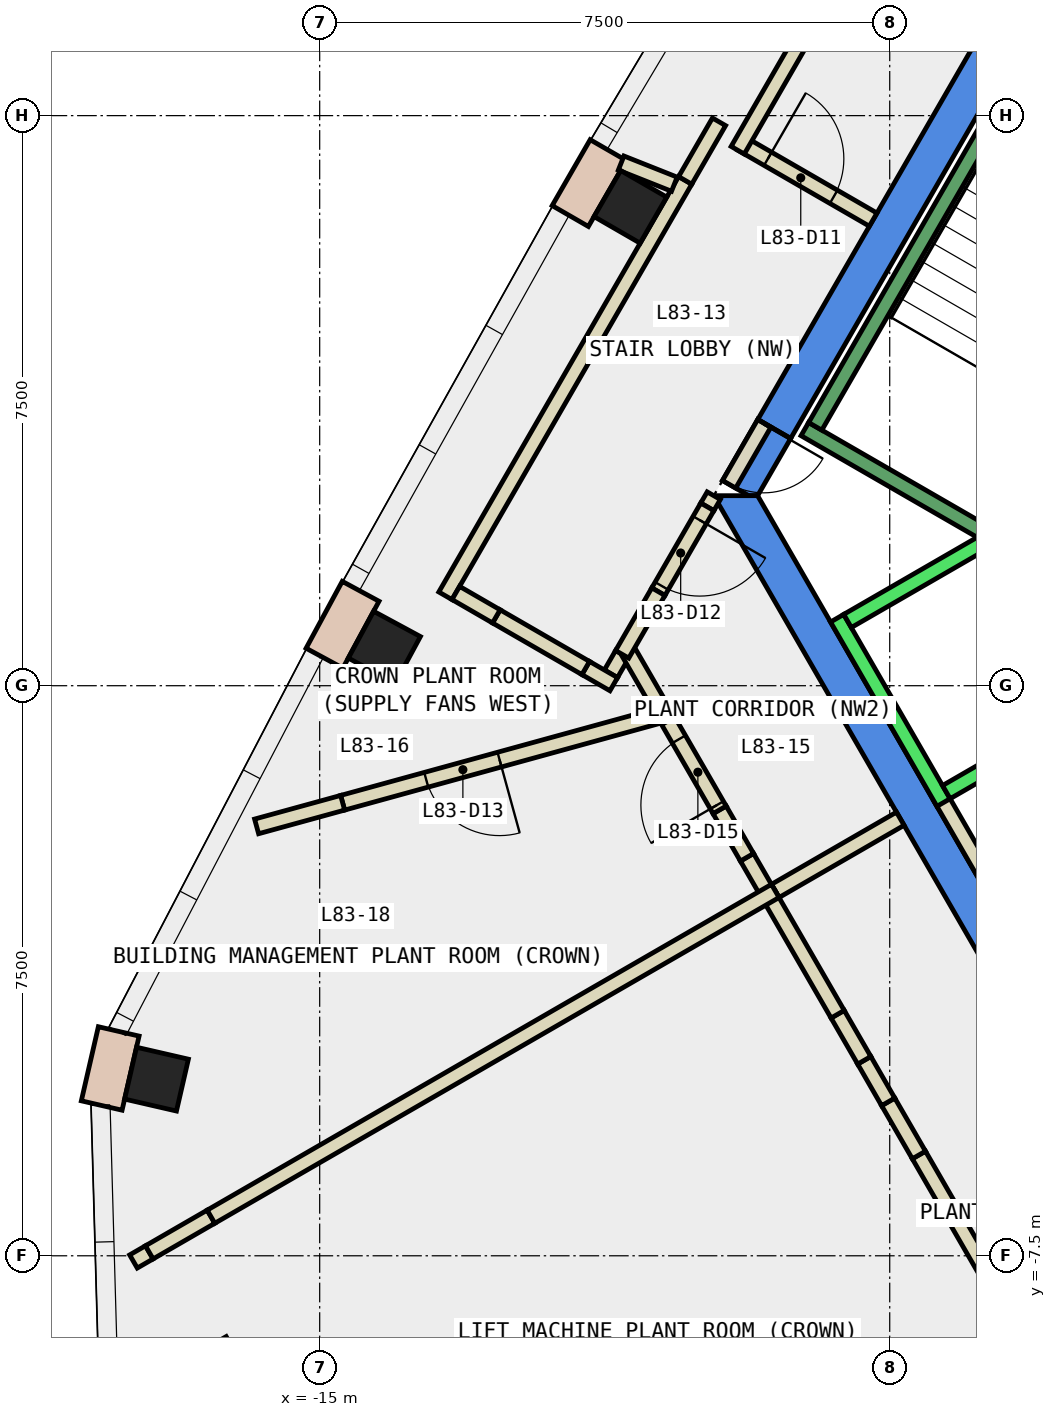
"""IFC4 building model, lengths in metres.
Left out: names, types, materials, properties, quantities, classifications, styles, units other than length and angle.
Written with IfcOpenShell. Run it as: python <this file> out.ifc"""

import sys

from ifc_helpers import new_model, si_unit, direction, frame, frame_2d, origin, origin_2d, place, context, subcontext, project, spatial, polyline, rectangle, outline, extrude, element, fill, save


model = new_model("IFC4")
c1 = context("Model", 3, precision=1e-05, world=origin(), true_north=direction((0.0, 1.0)))
c2 = subcontext(c1, "Body", "Model", "MODEL_VIEW")
j1 = project(units=[si_unit("LENGTHUNIT", "METRE"), si_unit("PLANEANGLEUNIT", "RADIAN")], contexts=[c1])
p1 = place(None, origin())
s1 = spatial("IfcSite", under=j1, at=p1, CompositionType="ELEMENT")
p2 = place(p1, origin())
s2 = spatial("IfcBuilding", under=s1, at=p2, CompositionType="ELEMENT")
p3 = place(p2, frame((0.0, 0.0, 353.9)))
s3 = spatial("IfcBuildingStorey", under=s2, at=p3, CompositionType="ELEMENT", Elevation=353.9)
for number, where, z_axis, x_axis in (
    (1, (-10.912, 6.3, -0.35), (0.0, 0.0, 1.0), (0.5, 0.866, 0.0)),
    (2, (-14.149, 0.505, -0.35), (0.0, 0.0, 1.0), (0.475, 0.88, 0.0)),
    (3, (-17.147, -5.176, -0.35), (0.0, 0.0, 1.0), (0.224, 0.974, 0.0)),
):
    element("IfcColumn", number, at=place(p3, frame(where, z_axis=z_axis, x_axis=x_axis)), inside=s3, PredefinedType="COLUMN", context=c2, shape_type="SweptSolid", body=[
        extrude(rectangle(XDim=0.7, YDim=0.7, at=origin_2d()), origin(), (0.0, 0.0, 1.0), 4.4),
    ])
p4 = place(p3, frame((-16.486, -9.519, -0.35), z_axis=(0.0, 0.0, 1.0), x_axis=(0.866025403784, 0.5, 0.0)))
e4 = element("IfcColumn", 4, at=p4, inside=s3, PredefinedType="COLUMN", context=c2, shape_type="SweptSolid", body=[
    extrude(rectangle(XDim=1.4, YDim=1.4, at=origin_2d()), origin(), (0.0, 0.0, 1.0), 4.4),
])
p5 = place(p3, frame((0.0, 0.0, -0.35)))
e5 = element("IfcWall", 5, at=p5, inside=s3, PredefinedType="SHEAR", context=c2, shape_type="SweptSolid", body=[
    extrude(outline(polyline([(-9.236, 3.502), (-8.803, 3.253), (-4.619, 10.5), (-4.907, 11.0), (-9.236, 3.502)])), origin(), (0.0, 0.0, 1.0), 4.4),
])
p6 = place(p3, frame((0.0, 0.0, 3.6)))
e6 = element("IfcWall", 6, at=p6, inside=s3, PredefinedType="SHEAR", context=c2, shape_type="SweptSolid", body=[
    extrude(outline(polyline([(-9.7, 2.7), (-9.354, 2.5), (-9.238, 2.5), (-8.803, 3.253), (-9.236, 3.502), (-9.7, 2.7)])), origin(), (0.0, 0.0, 1.0), 0.45),
])
p7 = place(p3, frame((0.0, 0.0, -0.35)))
e7 = element("IfcWall", 7, at=p7, inside=s3, PredefinedType="SHEAR", context=c2, shape_type="SweptSolid", body=[
    extrude(outline(polyline([(-9.815, 2.5), (-4.907, -6.0), (-4.619, -5.5), (-9.238, 2.5), (-9.815, 2.5)])), origin(), (0.0, 0.0, 1.0), 4.4),
])
p8 = place(p3, frame((-11.203, 7.046, 0.0), z_axis=(0.0, 0.0, 1.0), x_axis=(-0.49960277677, -0.866254619292, 0.0)))
e8 = element("IfcWall", 8, at=p8, inside=s3, PredefinedType="STANDARD", context=c2, shape_type="SweptSolid", body=[
    extrude(rectangle(XDim=1.001, YDim=0.55, at=frame_2d((0.5, 0.0))), origin(), (0.0, 0.0, 1.0), 4.05),
])
p9 = place(p3, frame((-14.461, 1.242, 0.0), z_axis=(0.0, 0.0, 1.0), x_axis=(-0.475874292304, -0.879513307417, 0.0)))
e9 = element("IfcWall", 9, at=p9, inside=s3, PredefinedType="STANDARD", context=c2, shape_type="SweptSolid", body=[
    extrude(rectangle(XDim=1.0, YDim=0.55, at=frame_2d((0.5, 0.0))), origin(), (0.0, 0.0, 1.0), 4.05),
])
p10 = place(p3, frame((-17.644, -4.548, 0.0), z_axis=(0.0, 0.0, 1.0), x_axis=(-0.223825449309, -0.974629246556, 0.0)))
e10 = element("IfcWall", 10, at=p10, inside=s3, PredefinedType="STANDARD", context=c2, shape_type="SweptSolid", body=[
    extrude(rectangle(XDim=1.0, YDim=0.55, at=frame_2d((0.5, 0.0))), origin(), (0.0, 0.0, 1.0), 4.05),
])
p11 = place(p3, frame((-5.492, -3.788, 0.0), z_axis=(0.0, 0.0, 1.0), x_axis=(-0.500008949224, 0.866020236886, 0.0)))
e11 = element("IfcWall", 11, at=p11, inside=s3, PredefinedType="PARTITIONING", context=c2, shape_type="SweptSolid", body=[
    extrude(rectangle(XDim=2.68, YDim=0.2, at=frame_2d((1.34, 0.0))), origin(), (0.0, 0.0, 1.0), 4.05),
])
p12 = place(p3, frame((-6.112, -7.913, 0.0), z_axis=(0.0, 0.0, 1.0), x_axis=(-0.499957508411, 0.866049934925, 0.0)))
e12 = element("IfcWall", 12, at=p12, inside=s3, PredefinedType="PARTITIONING", context=c2, shape_type="SweptSolid", body=[
    extrude(rectangle(XDim=2.008, YDim=0.2, at=frame_2d((1.004, 0.0))), origin(), (0.0, 0.0, 1.0), 4.05),
])
p13 = place(p3, frame((-9.006, -2.7, 0.0), z_axis=(0.0, 0.0, 1.0), x_axis=(0.865980106173, 0.500078449558, 0.0)))
e13 = element("IfcWall", 13, at=p13, inside=s3, PredefinedType="PARTITIONING", context=c2, shape_type="SweptSolid", body=[
    extrude(rectangle(XDim=1.9, YDim=0.2, at=frame_2d((0.95, 0.0))), origin(), (0.0, 0.0, 1.0), 4.05),
])
p14 = place(p3, frame((-17.45, -7.575, 0.0), z_axis=(0.0, 0.0, 1.0), x_axis=(0.866422508423, 0.499311562953, 0.0)))
e14 = element("IfcWall", 14, at=p14, inside=s3, PredefinedType="PARTITIONING", context=c2, shape_type="SweptSolid", body=[
    extrude(rectangle(XDim=0.24, YDim=0.2, at=frame_2d((0.12, 0.0))), origin(), (0.0, 0.0, 1.0), 4.05),
])
p15 = place(p3, frame((-9.45, 7.132, 0.0), z_axis=(0.0, 0.0, 1.0), x_axis=(0.866010750942, -0.50002537861, 0.0)))
e15 = element("IfcWall", 15, at=p15, inside=s3, PredefinedType="PARTITIONING", context=c2, shape_type="SweptSolid", body=[
    extrude(rectangle(XDim=2.0, YDim=0.2, at=frame_2d((1.0, 0.0))), origin(), (0.0, 0.0, 1.0), 4.05),
])
p16 = place(p15, frame((0.4, 0.0, 0.0)))
e16 = element("IfcOpeningElement", 16, at=p16, cuts=e15, PredefinedType="OPENING", context=c2, shape_type="SweptSolid", body=[
    extrude(rectangle(XDim=1.0, YDim=2.1, at=frame_2d((0.5, 1.05))), frame((0.0, 0.11, 0.0), z_axis=(0.0, -1.0, 0.0), x_axis=(1.0, 0.0, 0.0)), (0.0, 0.0, 1.0), 0.22),
])
p17 = place(p3, frame((-9.815, 2.5, 0.0), z_axis=(0.0, 0.0, 1.0), x_axis=(-0.5004692653, -0.865754303766, 0.0)))
e17 = element("IfcWall", 17, at=p17, inside=s3, PredefinedType="PARTITIONING", context=c2, shape_type="SweptSolid", body=[
    extrude(rectangle(XDim=0.17, YDim=0.2, at=frame_2d((0.085, 0.0))), origin(), (0.0, 0.0, 1.0), 2.4),
])
p18 = place(p3, frame((-11.02, 0.413, 0.0), z_axis=(0.0, 0.0, 1.0), x_axis=(-0.500222587251, -0.865896854829, 0.0)))
e18 = element("IfcWall", 18, at=p18, inside=s3, PredefinedType="PARTITIONING", context=c2, shape_type="SweptSolid", body=[
    extrude(rectangle(XDim=0.296, YDim=0.2, at=frame_2d((0.148, 0.0))), origin(), (0.0, 0.0, 1.0), 1.95),
])
p19 = place(p3, frame((-11.131, 0.02, 0.0), z_axis=(0.0, 0.0, 1.0), x_axis=(-0.86611877815, 0.499838235968, 0.0)))
e19 = element("IfcWall", 19, at=p19, inside=s3, PredefinedType="PARTITIONING", context=c2, shape_type="SweptSolid", body=[
    extrude(rectangle(XDim=0.426, YDim=0.2, at=frame_2d((0.213, 0.0))), origin(), (0.0, 0.0, 1.0), 4.05),
])
p20 = place(p3, frame((-13.346, 1.183, 0.0), z_axis=(0.0, 0.0, 1.0), x_axis=(0.49998814853, 0.866032246126, 0.0)))
e20 = element("IfcWall", 20, at=p20, inside=s3, PredefinedType="PARTITIONING", context=c2, shape_type="SweptSolid", body=[
    extrude(rectangle(XDim=6.31, YDim=0.2, at=frame_2d((3.155, 0.0))), origin(), (0.0, 0.0, 1.0), 1.95),
])
p21 = place(p3, frame((-10.191, 6.648, 0.0), z_axis=(0.0, 0.0, 1.0), x_axis=(0.49973828311, 0.866176453382, 0.0)))
e21 = element("IfcWall", 21, at=p21, inside=s3, PredefinedType="PARTITIONING", context=c2, shape_type="SweptSolid", body=[
    extrude(rectangle(XDim=0.89, YDim=0.2, at=frame_2d((0.445, 0.0))), origin(), (0.0, 0.0, 1.0), 1.95),
])
p22 = place(p3, frame((-9.5, 7.045, 0.0), z_axis=(0.0, 0.0, 1.0), x_axis=(0.499984700226, 0.866034236933, 0.0)))
e22 = element("IfcWall", 22, at=p22, inside=s3, PredefinedType="PARTITIONING", context=c2, shape_type="SweptSolid", body=[
    extrude(rectangle(XDim=4.486, YDim=0.2, at=frame_2d((2.243, 0.0))), origin(), (0.0, 0.0, 1.0), 4.05),
])
p23 = place(p3, frame((-10.514, -0.289, 0.0), z_axis=(0.0, 0.0, 1.0), x_axis=(-0.500402557727, 0.865792862191, 0.0)))
e23 = element("IfcWall", 23, at=p23, inside=s3, PredefinedType="PARTITIONING", context=c2, shape_type="SweptSolid", body=[
    extrude(rectangle(XDim=0.911, YDim=0.2, at=frame_2d((0.456, 0.0))), origin(), (0.0, 0.0, 1.0), 1.95),
])
p24 = place(p3, frame((-9.093, -2.75, 0.0), z_axis=(0.0, 0.0, 1.0), x_axis=(-0.500427620203, 0.86577837634, 0.0)))
e24 = element("IfcWall", 24, at=p24, inside=s3, PredefinedType="PARTITIONING", context=c2, shape_type="SweptSolid", body=[
    extrude(rectangle(XDim=0.569, YDim=0.2, at=frame_2d((0.285, 0.0))), origin(), (0.0, 0.0, 1.0), 4.05),
])
p25 = place(p3, frame((-11.034, 6.876, 0.0), z_axis=(0.0, 0.0, 1.0), x_axis=(0.929345991637, -0.369210005049, 0.0)))
e25 = element("IfcWall", 25, at=p25, inside=s3, PredefinedType="PARTITIONING", context=c2, shape_type="SweptSolid", body=[
    extrude(rectangle(XDim=0.753, YDim=0.2, at=frame_2d((0.376, 0.0))), origin(), (0.0, 0.0, 1.0), 1.95),
])
p26 = place(p3, frame((-10.368, -0.349, 0.0), z_axis=(0.0, 0.0, 1.0), x_axis=(-0.964197052958, -0.265186807867, 0.0)))
e26 = element("IfcWall", 26, at=p26, inside=s3, PredefinedType="PARTITIONING", context=c2, shape_type="SweptSolid", body=[
    extrude(rectangle(XDim=4.491, YDim=0.2, at=frame_2d((2.246, 0.0))), origin(), (0.0, 0.0, 1.0), 4.05),
])
p27 = place(p26, frame((2.35, 0.0, 0.0)))
e27 = element("IfcOpeningElement", 27, at=p27, cuts=e26, PredefinedType="OPENING", context=c2, shape_type="SweptSolid", body=[
    extrude(rectangle(XDim=1.0, YDim=2.1, at=frame_2d((0.5, 1.05))), frame((0.0, 0.11, 0.0), z_axis=(0.0, -1.0, 0.0), x_axis=(1.0, 0.0, 0.0)), (0.0, 0.0, 1.0), 0.22),
])
p28 = place(p3, frame((-9.15, 3.452, 0.0), z_axis=(0.0, 0.0, 1.0), x_axis=(-0.500079945886, -0.865979242085, 0.0)))
e28 = element("IfcWall", 28, at=p28, inside=s3, PredefinedType="PARTITIONING", context=c2, shape_type="SweptSolid", body=[
    extrude(rectangle(XDim=0.926, YDim=0.2, at=frame_2d((0.463, 0.0))), origin(), (0.0, 0.0, 1.0), 2.4),
])
p29 = place(p28, frame((0.017, 0.0, 0.0)))
e29 = element("IfcOpeningElement", 29, at=p29, cuts=e28, PredefinedType="OPENING", context=c2, shape_type="SweptSolid", body=[
    extrude(rectangle(XDim=0.9, YDim=2.1, at=frame_2d((0.45, 1.05))), frame((0.0, 0.11, 0.0), z_axis=(0.0, -1.0, 0.0), x_axis=(1.0, 0.0, 0.0)), (0.0, 0.0, 1.0), 0.22),
])
p30 = place(p3, frame((-7.116, -6.174, 0.0), z_axis=(0.0, 0.0, 1.0), x_axis=(-0.500463994258, 0.865757350792, 0.0)))
e30 = element("IfcWall", 30, at=p30, inside=s3, PredefinedType="PARTITIONING", context=c2, shape_type="SweptSolid", body=[
    extrude(rectangle(XDim=0.807, YDim=0.2, at=frame_2d((0.404, 0.0))), origin(), (0.0, 0.0, 1.0), 1.95),
])
p31 = place(p3, frame((-7.52, -5.475, 0.0), z_axis=(0.0, 0.0, 1.0), x_axis=(-0.49888522925, 0.866668061046, 0.0)))
e31 = element("IfcWall", 31, at=p31, inside=s3, PredefinedType="PARTITIONING", context=c2, shape_type="SweptSolid", body=[
    extrude(rectangle(XDim=0.631, YDim=0.2, at=frame_2d((0.316, 0.0))), origin(), (0.0, 0.0, 1.0), 4.05),
])
p32 = place(p3, frame((-7.835, -4.928, 0.0), z_axis=(0.0, 0.0, 1.0), x_axis=(-0.500265973451, 0.865871789474, 0.0)))
e32 = element("IfcWall", 32, at=p32, inside=s3, PredefinedType="PARTITIONING", context=c2, shape_type="SweptSolid", body=[
    extrude(rectangle(XDim=0.7, YDim=0.2, at=frame_2d((0.35, 0.0))), origin(), (0.0, 0.0, 1.0), 1.95),
])
p33 = place(p3, frame((-8.185, -4.322, 0.0), z_axis=(0.0, 0.0, 1.0), x_axis=(-0.500145398563, 0.865941441609, 0.0)))
e33 = element("IfcWall", 33, at=p33, inside=s3, PredefinedType="PARTITIONING", context=c2, shape_type="SweptSolid", body=[
    extrude(rectangle(XDim=1.815, YDim=0.2, at=frame_2d((0.908, 0.0))), origin(), (0.0, 0.0, 1.0), 4.05),
])
p34 = place(p3, frame((-17.242, -7.455, 0.0), z_axis=(0.0, 0.0, 1.0), x_axis=(0.865942754999, 0.50014312458, 0.0)))
e34 = element("IfcWall", 34, at=p34, inside=s3, PredefinedType="PARTITIONING", context=c2, shape_type="SweptSolid", body=[
    extrude(rectangle(XDim=0.938, YDim=0.2, at=frame_2d((0.469, 0.0))), origin(), (0.0, 0.0, 1.0), 1.95),
])
p35 = place(p3, frame((-16.43, -6.986, 0.0), z_axis=(0.0, 0.0, 1.0), x_axis=(0.866026229868, 0.499998569178, 0.0)))
e35 = element("IfcWall", 35, at=p35, inside=s3, PredefinedType="PARTITIONING", context=c2, shape_type="SweptSolid", body=[
    extrude(rectangle(XDim=8.572, YDim=0.2, at=frame_2d((4.286, 0.0))), origin(), (0.0, 0.0, 1.0), 4.05),
])
p36 = place(p3, frame((-9.9, 2.353, 0.0), z_axis=(0.0, 0.0, 1.0), x_axis=(-0.499848207415, -0.866113023539, 0.0)))
e36 = element("IfcWall", 36, at=p36, inside=s3, PredefinedType="PARTITIONING", context=c2, shape_type="SweptSolid", body=[
    extrude(rectangle(XDim=1.289, YDim=0.2, at=frame_2d((0.644, 0.0))), origin(), (0.0, 0.0, 1.0), 4.05),
])
p37 = place(p36, frame((0.201, 0.0, 0.0)))
e37 = element("IfcOpeningElement", 37, at=p37, cuts=e36, PredefinedType="OPENING", context=c2, shape_type="SweptSolid", body=[
    extrude(rectangle(XDim=1.0, YDim=2.1, at=frame_2d((0.5, 1.05))), frame((0.0, 0.11, 0.0), z_axis=(0.0, -1.0, 0.0), x_axis=(1.0, 0.0, 0.0)), (0.0, 0.0, 1.0), 0.22),
])
p38 = place(p3, frame((-10.544, 1.237, 0.0), z_axis=(0.0, 0.0, 1.0), x_axis=(-0.500277597875, -0.865865073245, 0.0)))
e38 = element("IfcWall", 38, at=p38, inside=s3, PredefinedType="PARTITIONING", context=c2, shape_type="SweptSolid", body=[
    extrude(rectangle(XDim=0.952, YDim=0.2, at=frame_2d((0.476, 0.0))), origin(), (0.0, 0.0, 1.0), 1.95),
])
p39 = place(p3, frame((-11.5, 0.233, 0.0), z_axis=(0.0, 0.0, 1.0), x_axis=(-0.86595504438, 0.500121846266, 0.0)))
e39 = element("IfcWall", 39, at=p39, inside=s3, PredefinedType="PARTITIONING", context=c2, shape_type="SweptSolid", body=[
    extrude(rectangle(XDim=1.358, YDim=0.2, at=frame_2d((0.679, 0.0))), origin(), (0.0, 0.0, 1.0), 1.95),
])
p40 = place(p3, frame((-12.676, 0.912, 0.0), z_axis=(0.0, 0.0, 1.0), x_axis=(-0.865914706893, 0.500191683643, 0.0)))
e40 = element("IfcWall", 40, at=p40, inside=s3, PredefinedType="PARTITIONING", context=c2, shape_type="SweptSolid", body=[
    extrude(rectangle(XDim=0.615, YDim=0.2, at=frame_2d((0.308, 0.0))), origin(), (0.0, 0.0, 1.0), 4.05),
])
p41 = place(p3, frame((-9.378, -2.257, 0.0), z_axis=(0.0, 0.0, 1.0), x_axis=(-0.499820234884, 0.866129166349, 0.0)))
e41 = element("IfcWall", 41, at=p41, inside=s3, PredefinedType="PARTITIONING", context=c2, shape_type="SweptSolid", body=[
    extrude(rectangle(XDim=0.72, YDim=0.2, at=frame_2d((0.36, 0.0))), origin(), (0.0, 0.0, 1.0), 1.95),
])
p42 = place(p3, frame((-9.738, -1.633, 0.0), z_axis=(0.0, 0.0, 1.0), x_axis=(-0.500238469565, 0.865887679533, 0.0)))
e42 = element("IfcWall", 42, at=p42, inside=s3, PredefinedType="PARTITIONING", context=c2, shape_type="SweptSolid", body=[
    extrude(rectangle(XDim=1.351, YDim=0.2, at=frame_2d((0.676, 0.0))), origin(), (0.0, 0.0, 1.0), 4.05),
])
p43 = place(p42, frame((0.072, 0.0, 0.0)))
e43 = element("IfcOpeningElement", 43, at=p43, cuts=e42, PredefinedType="OPENING", context=c2, shape_type="SweptSolid", body=[
    extrude(rectangle(XDim=1.0, YDim=2.1, at=frame_2d((0.5, 1.05))), frame((0.0, 0.11, 0.0), z_axis=(0.0, -1.0, 0.0), x_axis=(1.0, 0.0, 0.0)), (0.0, 0.0, 1.0), 0.22),
])
p44 = place(p3, frame((-14.698, -1.54, 0.0), z_axis=(0.0, 0.0, 1.0), x_axis=(-0.964267835865, -0.264929312679, 0.0)))
e44 = element("IfcWall", 44, at=p44, inside=s3, PredefinedType="PARTITIONING", context=c2, shape_type="SweptSolid", body=[
    extrude(rectangle(XDim=1.174, YDim=0.2, at=frame_2d((0.587, 0.0))), origin(), (0.0, 0.0, 1.0), 1.95),
])
p45 = place(p3, frame((-8.192, 0.888, 0.0), z_axis=(0.0, 0.0, 1.0), x_axis=(0.49994636267, -0.866056369097, 0.0)))
e45 = element("IfcWall", 45, at=p45, inside=s3, PredefinedType="STANDARD", context=c2, shape_type="SweptSolid", body=[
    extrude(rectangle(XDim=2.8, YDim=0.2, at=frame_2d((1.4, 0.0))), origin(), (0.0, 0.0, 1.0), 4.05),
])
for number, where, z_axis, x_axis in (
    (46, (-5.977, 2.052, 0.0), (0.0, 0.0, 1.0), (-0.866, -0.5, 0.0)),
    (47, (-4.677, -0.2, 0.0), (0.0, 0.0, 1.0), (-0.866, -0.5, 0.0)),
):
    element("IfcWall", number, at=place(p3, frame(where, z_axis=z_axis, x_axis=x_axis)), inside=s3, PredefinedType="STANDARD", context=c2, shape_type="SweptSolid", body=[
        extrude(rectangle(XDim=2.399, YDim=0.2, at=frame_2d((1.2, 0.0))), origin(), (0.0, 0.0, 1.0), 4.05),
    ])
p46 = place(p3, frame((-6.25, 2.01, 0.0), z_axis=(0.0, 0.0, 1.0), x_axis=(-0.86611865017, 0.499838457731, 0.0)))
e48 = element("IfcWall", 48, at=p46, inside=s3, PredefinedType="STANDARD", context=c2, shape_type="SweptSolid", body=[
    extrude(rectangle(XDim=2.733, YDim=0.2, at=frame_2d((1.366, 0.0))), origin(), (0.0, 0.0, 1.0), 4.05),
])
p47 = place(p3, frame((-5.03, 9.388, 0.0), z_axis=(0.0, 0.0, 1.0), x_axis=(-0.499978703459, -0.866037698999, 0.0)))
e49 = element("IfcWall", 49, at=p47, inside=s3, PredefinedType="STANDARD", context=c2, shape_type="SweptSolid", body=[
    extrude(rectangle(XDim=6.9, YDim=0.2, at=frame_2d((3.45, 0.0))), origin(), (0.0, 0.0, 1.0), 4.05),
])
p48 = place(p16, origin())
e50 = element("IfcDoor", 50, at=p48, inside=s3, OperationType="SINGLE_SWING_LEFT", PredefinedType="DOOR", context=c2, shape_type="SweptSolid", body=[
    extrude(rectangle(XDim=1.0, YDim=2.1, at=frame_2d((0.5, 1.05))), frame((0.0, 0.025, 0.0), z_axis=(0.0, -1.0, 0.0), x_axis=(1.0, 0.0, 0.0)), (0.0, 0.0, 1.0), 0.05),
])
fill(e16, e50)
p49 = place(p37, origin())
e51 = element("IfcDoor", 51, at=p49, inside=s3, OperationType="SINGLE_SWING_RIGHT", PredefinedType="DOOR", context=c2, shape_type="SweptSolid", body=[
    extrude(rectangle(XDim=1.0, YDim=2.1, at=frame_2d((0.5, 1.05))), frame((0.0, 0.025, 0.0), z_axis=(0.0, -1.0, 0.0), x_axis=(1.0, 0.0, 0.0)), (0.0, 0.0, 1.0), 0.05),
])
fill(e37, e51)
p50 = place(p27, origin())
e52 = element("IfcDoor", 52, at=p50, inside=s3, OperationType="SINGLE_SWING_LEFT", PredefinedType="DOOR", context=c2, shape_type="SweptSolid", body=[
    extrude(rectangle(XDim=1.0, YDim=2.1, at=frame_2d((0.5, 1.05))), frame((0.0, 0.025, 0.0), z_axis=(0.0, -1.0, 0.0), x_axis=(1.0, 0.0, 0.0)), (0.0, 0.0, 1.0), 0.05),
])
fill(e27, e52)
p51 = place(p43, origin())
e53 = element("IfcDoor", 53, at=p51, inside=s3, OperationType="SINGLE_SWING_LEFT", PredefinedType="DOOR", context=c2, shape_type="SweptSolid", body=[
    extrude(rectangle(XDim=1.0, YDim=2.1, at=frame_2d((0.5, 1.05))), frame((0.0, 0.025, 0.0), z_axis=(0.0, -1.0, 0.0), x_axis=(1.0, 0.0, 0.0)), (0.0, 0.0, 1.0), 0.05),
])
fill(e43, e53)
p52 = place(p29, origin())
e54 = element("IfcDoor", 54, at=p52, inside=s3, OperationType="SINGLE_SWING_LEFT", PredefinedType="DOOR", context=c2, shape_type="SweptSolid", body=[
    extrude(rectangle(XDim=0.9, YDim=2.1, at=frame_2d((0.45, 1.05))), frame((0.0, 0.025, 0.0), z_axis=(0.0, -1.0, 0.0), x_axis=(1.0, 0.0, 0.0)), (0.0, 0.0, 1.0), 0.05),
])
fill(e29, e54)
save(model, sys.argv[1])
